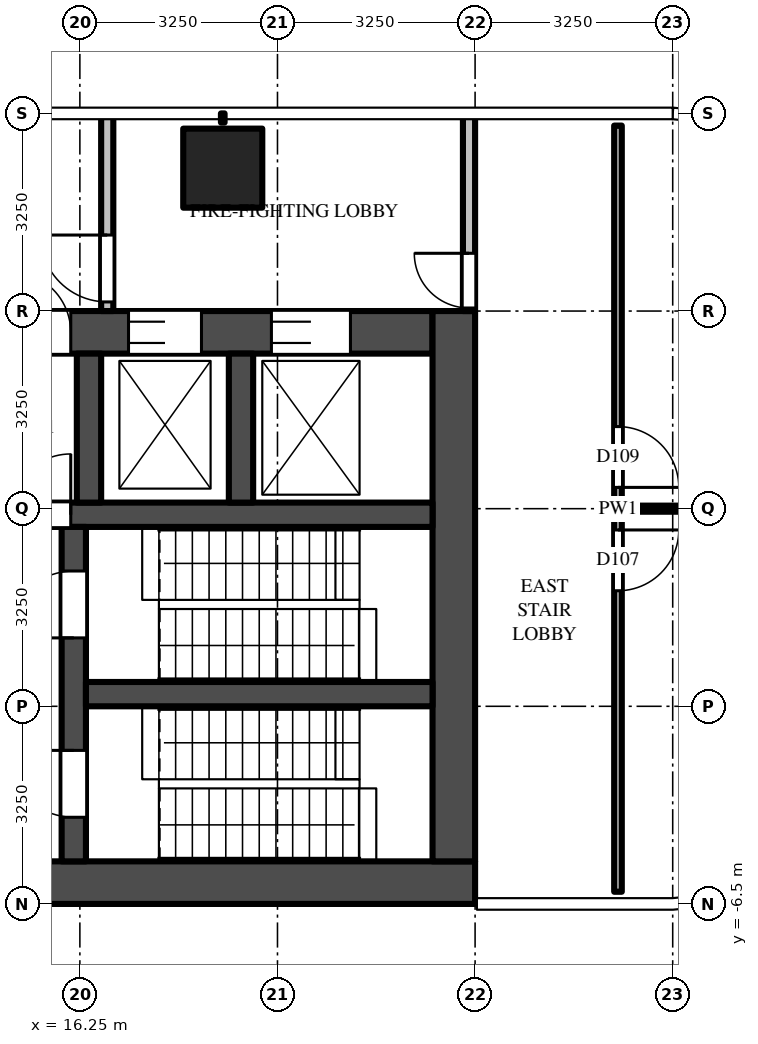
"""IFC4 building model, lengths in metres.
Left out: names, types, materials, properties, quantities, classifications, styles, units other than length and angle.
Written with IfcOpenShell. Run it as: python <this file> out.ifc"""

import sys

from ifc_helpers import new_model, si_unit, direction, frame, frame_2d, origin, origin_2d, place, context, subcontext, project, spatial, rectangle, extrude, source, transform, mapped, element, fill, save


model = new_model("IFC4")
c1 = context("Model", 3, precision=1e-05, world=origin(), true_north=direction((0.0, 1.0)))
c2 = subcontext(c1, "Body", "Model", "MODEL_VIEW")
j1 = project(units=[si_unit("LENGTHUNIT", "METRE"), si_unit("PLANEANGLEUNIT", "RADIAN")], contexts=[c1])
p1 = place(None, origin())
s1 = spatial("IfcSite", under=j1, at=p1, CompositionType="ELEMENT")
p2 = place(p1, origin())
s2 = spatial("IfcBuilding", under=s1, at=p2, CompositionType="ELEMENT")
p3 = place(p2, frame((0.0, 0.0, 138.0)))
s3 = spatial("IfcBuildingStorey", under=s2, at=p3, CompositionType="ELEMENT", Elevation=138.0)
m1 = source(origin(), c2, "Body", "SweptSolid", [
    extrude(rectangle(XDim=1.3, YDim=1.3, at=origin_2d()), origin(), (0.0, 0.0, 1.0), 4.5),
])
p4 = place(p3, frame((18.6, 5.6, 0.0), z_axis=(0.0, 0.0, 1.0), x_axis=(1.0, 0.0, 0.0)))
e1 = element("IfcColumn", 1, at=p4, inside=s3, PredefinedType="COLUMN", context=c2, shape_type="MappedRepresentation", body=[
    mapped(m1, transform((0.0, 0.0, 0.0))),
])
m2 = source(origin(), c2, "Body", "SweptSolid", [
    extrude(rectangle(XDim=16.5, YDim=0.7, at=frame_2d((8.25, 0.0))), origin(), (0.0, 0.0, 1.0), 4.25),
])
p5 = place(p3, frame((6.25, -6.15, 0.0), z_axis=(0.0, 0.0, 1.0), x_axis=(1.0, 0.0, 0.0)))
e2 = element("IfcWall", 2, at=p5, inside=s3, PredefinedType="SHEAR", context=c2, shape_type="MappedRepresentation", body=[
    mapped(m2, transform((0.0, 0.0, 0.0))),
])
m3 = source(origin(), c2, "Body", "SweptSolid", [
    extrude(rectangle(XDim=14.85, YDim=0.7, at=frame_2d((7.425, 0.0))), origin(), (0.0, 0.0, 1.0), 4.25),
])
p6 = place(p3, frame((7.2, 2.9, 0.0), z_axis=(0.0, 0.0, 1.0), x_axis=(1.0, 0.0, 0.0)))
e3 = element("IfcWall", 3, at=p6, inside=s3, PredefinedType="SHEAR", context=c2, shape_type="MappedRepresentation", body=[
    mapped(m3, transform((0.0, 0.0, 0.0))),
])
m4 = source(origin(), c2, "Body", "SweptSolid", [
    extrude(rectangle(XDim=1.3, YDim=2.1, at=frame_2d((0.65, 1.05))), frame((0.0, 0.36, 0.0), z_axis=(0.0, -1.0, 0.0), x_axis=(1.0, 0.0, 0.0)), (0.0, 0.0, 1.0), 0.72),
])
p7 = place(p6, frame((12.2, 0.0, 0.0)))
e4 = element("IfcOpeningElement", 4, at=p7, cuts=e3, PredefinedType="OPENING", context=c2, shape_type="MappedRepresentation", body=[
    mapped(m4, transform((0.0, 0.0, 0.0))),
])
m5 = source(origin(), c2, "Body", "SweptSolid", [
    extrude(rectangle(XDim=1.2, YDim=2.1, at=frame_2d((0.6, 1.05))), frame((0.0, 0.36, 0.0), z_axis=(0.0, -1.0, 0.0), x_axis=(1.0, 0.0, 0.0)), (0.0, 0.0, 1.0), 0.72),
])
p8 = place(p6, frame((9.85, 0.0, 0.0)))
e5 = element("IfcOpeningElement", 5, at=p8, cuts=e3, PredefinedType="OPENING", context=c2, shape_type="MappedRepresentation", body=[
    mapped(m5, transform((0.0, 0.0, 0.0))),
])
m6 = source(origin(), c2, "Body", "SweptSolid", [
    extrude(rectangle(XDim=1.0, YDim=2.1, at=frame_2d((0.5, 1.05))), frame((0.0, 0.36, 0.0), z_axis=(0.0, -1.0, 0.0), x_axis=(1.0, 0.0, 0.0)), (0.0, 0.0, 1.0), 0.72),
])
p9 = place(p6, frame((7.9, 0.0, 0.0)))
e6 = element("IfcOpeningElement", 6, at=p9, cuts=e3, PredefinedType="OPENING", context=c2, shape_type="MappedRepresentation", body=[
    mapped(m6, transform((0.0, 0.0, 0.0))),
])
m7 = source(origin(), c2, "Body", "SweptSolid", [
    extrude(rectangle(XDim=0.8, YDim=2.1, at=frame_2d((0.4, 1.05))), frame((0.0, 0.36, 0.0), z_axis=(0.0, -1.0, 0.0), x_axis=(1.0, 0.0, 0.0)), (0.0, 0.0, 1.0), 0.72),
])
p10 = place(p6, frame((0.113, 0.0, 0.0)))
e7 = element("IfcOpeningElement", 7, at=p10, cuts=e3, PredefinedType="OPENING", context=c2, shape_type="MappedRepresentation", body=[
    mapped(m7, transform((0.0, 0.0, 0.0))),
])
p11 = place(p6, frame((1.288, 0.0, 0.0)))
e8 = element("IfcOpeningElement", 8, at=p11, cuts=e3, PredefinedType="OPENING", context=c2, shape_type="MappedRepresentation", body=[
    mapped(m7, transform((0.0, 0.0, 0.0))),
])
p12 = place(p6, frame((2.712, 0.0, 0.0)))
e9 = element("IfcOpeningElement", 9, at=p12, cuts=e3, PredefinedType="OPENING", context=c2, shape_type="MappedRepresentation", body=[
    mapped(m7, transform((0.0, 0.0, 0.0))),
])
p13 = place(p6, frame((3.887, 0.0, 0.0)))
e10 = element("IfcOpeningElement", 10, at=p13, cuts=e3, PredefinedType="OPENING", context=c2, shape_type="MappedRepresentation", body=[
    mapped(m7, transform((0.0, 0.0, 0.0))),
])
p14 = place(p6, frame((5.312, 0.0, 0.0)))
e11 = element("IfcOpeningElement", 11, at=p14, cuts=e3, PredefinedType="OPENING", context=c2, shape_type="MappedRepresentation", body=[
    mapped(m7, transform((0.0, 0.0, 0.0))),
])
p15 = place(p6, frame((6.488, 0.0, 0.0)))
e12 = element("IfcOpeningElement", 12, at=p15, cuts=e3, PredefinedType="OPENING", context=c2, shape_type="MappedRepresentation", body=[
    mapped(m7, transform((0.0, 0.0, 0.0))),
])
m8 = source(origin(), c2, "Body", "SweptSolid", [
    extrude(rectangle(XDim=9.05, YDim=0.7, at=frame_2d((4.525, 0.0))), origin(), (0.0, 0.0, 1.0), 4.25),
])
p16 = place(p3, frame((22.4, -5.8, 0.0), z_axis=(0.0, 0.0, 1.0), x_axis=(0.0, 1.0, 0.0)))
e13 = element("IfcWall", 13, at=p16, inside=s3, PredefinedType="SHEAR", context=c2, shape_type="MappedRepresentation", body=[
    mapped(m8, transform((0.0, 0.0, 0.0))),
])
m9 = source(origin(), c2, "Body", "SweptSolid", [
    extrude(rectangle(XDim=14.85, YDim=0.4, at=frame_2d((7.425, 0.0))), origin(), (0.0, 0.0, 1.0), 4.25),
])
p17 = place(p3, frame((7.2, -0.1, 0.0), z_axis=(0.0, 0.0, 1.0), x_axis=(1.0, 0.0, 0.0)))
e14 = element("IfcWall", 14, at=p17, inside=s3, PredefinedType="SHEAR", context=c2, shape_type="MappedRepresentation", body=[
    mapped(m9, transform((0.0, 0.0, 0.0))),
])
m10 = source(origin(), c2, "Body", "SweptSolid", [
    extrude(rectangle(XDim=1.0, YDim=2.1, at=frame_2d((0.5, 1.05))), frame((0.0, 0.21, 0.0), z_axis=(0.0, -1.0, 0.0), x_axis=(1.0, 0.0, 0.0)), (0.0, 0.0, 1.0), 0.42),
])
p18 = place(p17, frame((7.9, 0.0, 0.0)))
e15 = element("IfcOpeningElement", 15, at=p18, cuts=e14, PredefinedType="OPENING", context=c2, shape_type="MappedRepresentation", body=[
    mapped(m10, transform((0.0, 0.0, 0.0))),
])
m11 = source(origin(), c2, "Body", "SweptSolid", [
    extrude(rectangle(XDim=5.5, YDim=0.4, at=frame_2d((2.75, 0.0))), origin(), (0.0, 0.0, 1.0), 4.25),
])
p19 = place(p3, frame((16.15, -5.8, 0.0), z_axis=(0.0, 0.0, 1.0), x_axis=(0.0, 1.0, 0.0)))
e16 = element("IfcWall", 16, at=p19, inside=s3, PredefinedType="SHEAR", context=c2, shape_type="MappedRepresentation", body=[
    mapped(m11, transform((0.0, 0.0, 0.0))),
])
m12 = source(origin(), c2, "Body", "SweptSolid", [
    extrude(rectangle(XDim=1.1, YDim=2.1, at=frame_2d((0.55, 1.05))), frame((0.0, 0.21, 0.0), z_axis=(0.0, -1.0, 0.0), x_axis=(1.0, 0.0, 0.0)), (0.0, 0.0, 1.0), 0.42),
])
p20 = place(p19, frame((0.725, 0.0, 0.0)))
e17 = element("IfcOpeningElement", 17, at=p20, cuts=e16, PredefinedType="OPENING", context=c2, shape_type="MappedRepresentation", body=[
    mapped(m12, transform((0.0, 0.0, 0.0))),
])
p21 = place(p19, frame((3.675, 0.0, 0.0)))
e18 = element("IfcOpeningElement", 18, at=p21, cuts=e16, PredefinedType="OPENING", context=c2, shape_type="MappedRepresentation", body=[
    mapped(m12, transform((0.0, 0.0, 0.0))),
])
m13 = source(origin(), c2, "Body", "SweptSolid", [
    extrude(rectangle(XDim=5.7, YDim=0.4, at=frame_2d((2.85, 0.0))), origin(), (0.0, 0.0, 1.0), 4.25),
])
p22 = place(p3, frame((16.35, -3.05, 0.0), z_axis=(0.0, 0.0, 1.0), x_axis=(1.0, 0.0, 0.0)))
e19 = element("IfcWall", 19, at=p22, inside=s3, PredefinedType="SHEAR", context=c2, shape_type="MappedRepresentation", body=[
    mapped(m13, transform((0.0, 0.0, 0.0))),
])
m14 = source(origin(), c2, "Body", "SweptSolid", [
    extrude(rectangle(XDim=2.45, YDim=0.4, at=frame_2d((1.225, 0.0))), origin(), (0.0, 0.0, 1.0), 4.25),
])
for number, where, z_axis, x_axis in (
    (20, (16.4, 0.1, 0.0), (0.0, 0.0, 1.0), (0.0, 1.0, 0.0)),
    (21, (18.9, 0.1, 0.0), (0.0, 0.0, 1.0), (0.0, 1.0, 0.0)),
):
    element("IfcWall", number, at=place(p3, frame(where, z_axis=z_axis, x_axis=x_axis)), inside=s3, PredefinedType="SHEAR", context=c2, shape_type="MappedRepresentation", body=[
        mapped(m14, transform((0.0, 0.0, 0.0))),
    ])
m15 = source(origin(), c2, "Body", "SweptSolid", [
    extrude(rectangle(XDim=3.25, YDim=0.2, at=frame_2d((1.625, 0.0))), origin(), (0.0, 0.0, 1.0), 4.25),
])
p23 = place(p3, frame((16.7, 3.25, 0.0), z_axis=(0.0, 0.0, 1.0), x_axis=(0.0, 1.0, 0.0)))
e22 = element("IfcWall", 22, at=p23, inside=s3, PredefinedType="PARTITIONING", context=c2, shape_type="MappedRepresentation", body=[
    mapped(m15, transform((0.0, 0.0, 0.0))),
])
m16 = source(origin(), c2, "Body", "SweptSolid", [
    extrude(rectangle(XDim=1.1, YDim=2.1, at=frame_2d((0.55, 1.05))), frame((0.0, 0.11, 0.0), z_axis=(0.0, -1.0, 0.0), x_axis=(1.0, 0.0, 0.0)), (0.0, 0.0, 1.0), 0.22),
])
p24 = place(p23, frame((0.15, 0.0, 0.0)))
e23 = element("IfcOpeningElement", 23, at=p24, cuts=e22, PredefinedType="OPENING", context=c2, shape_type="MappedRepresentation", body=[
    mapped(m16, transform((0.0, 0.0, 0.0))),
])
p25 = place(p3, frame((22.65, 3.25, 0.0), z_axis=(0.0, 0.0, 1.0), x_axis=(0.0, 1.0, 0.0)))
e24 = element("IfcWall", 24, at=p25, inside=s3, PredefinedType="PARTITIONING", context=c2, shape_type="MappedRepresentation", body=[
    mapped(m15, transform((0.0, 0.0, 0.0))),
])
m17 = source(origin(), c2, "Body", "SweptSolid", [
    extrude(rectangle(XDim=0.9, YDim=2.1, at=frame_2d((0.45, 1.05))), frame((0.0, 0.11, 0.0), z_axis=(0.0, -1.0, 0.0), x_axis=(1.0, 0.0, 0.0)), (0.0, 0.0, 1.0), 0.22),
])
p26 = place(p25, frame((0.05, 0.0, 0.0)))
e25 = element("IfcOpeningElement", 25, at=p26, cuts=e24, PredefinedType="OPENING", context=c2, shape_type="MappedRepresentation", body=[
    mapped(m17, transform((0.0, 0.0, 0.0))),
])
m18 = source(origin(), c2, "Body", "SweptSolid", [
    extrude(rectangle(XDim=12.6, YDim=0.125, at=frame_2d((6.3, 0.0))), origin(), (0.0, 0.0, 1.0), 3.33),
])
p27 = place(p3, frame((25.1, 6.3, 0.0), z_axis=(0.0, 0.0, 1.0), x_axis=(0.0, -1.0, 0.0)))
e26 = element("IfcWall", 26, at=p27, inside=s3, PredefinedType="PARTITIONING", context=c2, shape_type="MappedRepresentation", body=[
    mapped(m18, transform((0.0, 0.0, 0.0))),
])
m19 = source(origin(), c2, "Body", "SweptSolid", [
    extrude(rectangle(XDim=1.0, YDim=2.1, at=frame_2d((0.5, 1.05))), frame((0.0, 0.073, 0.0), z_axis=(0.0, -1.0, 0.0), x_axis=(1.0, 0.0, 0.0)), (0.0, 0.0, 1.0), 0.145),
])
p28 = place(p27, frame((6.65, 0.0, 0.0)))
e27 = element("IfcOpeningElement", 27, at=p28, cuts=e26, PredefinedType="OPENING", context=c2, shape_type="MappedRepresentation", body=[
    mapped(m19, transform((0.0, 0.0, 0.0))),
])
p29 = place(p27, frame((4.95, 0.0, 0.0)))
e28 = element("IfcOpeningElement", 28, at=p29, cuts=e26, PredefinedType="OPENING", context=c2, shape_type="MappedRepresentation", body=[
    mapped(m19, transform((0.0, 0.0, 0.0))),
])
m20 = source(origin(), c2, "Body", "SweptSolid", [
    extrude(rectangle(XDim=3.887, YDim=0.1, at=frame_2d((1.944, 0.0))), origin(), (0.0, 0.0, 1.0), 3.33),
])
p30 = place(p3, frame((25.163, 0.0, 0.0), z_axis=(0.0, 0.0, 1.0), x_axis=(1.0, 0.0, 0.0)))
e29 = element("IfcWall", 29, at=p30, inside=s3, PredefinedType="PARTITIONING", context=c2, shape_type="MappedRepresentation", body=[
    mapped(m20, transform((0.0, 0.0, 0.0))),
])
m21 = source(origin(), c2, "Body", "SweptSolid", [
    extrude(rectangle(XDim=1.3, YDim=2.1, at=frame_2d((0.65, 1.05))), frame((0.0, -0.275, 0.0), z_axis=(0.0, -1.0, 0.0), x_axis=(1.0, 0.0, 0.0)), (0.0, 0.0, 1.0), 0.05),
])
p31 = place(p7, origin())
e30 = element("IfcDoor", 30, at=p31, inside=s3, OperationType="DOUBLE_DOOR_SLIDING", PredefinedType="DOOR", context=c2, shape_type="MappedRepresentation", body=[
    mapped(m21, transform((0.0, 0.0, 0.0))),
])
fill(e4, e30)
m22 = source(origin(), c2, "Body", "SweptSolid", [
    extrude(rectangle(XDim=1.2, YDim=2.1, at=frame_2d((0.6, 1.05))), frame((0.0, -0.275, 0.0), z_axis=(0.0, -1.0, 0.0), x_axis=(1.0, 0.0, 0.0)), (0.0, 0.0, 1.0), 0.05),
])
p32 = place(p8, origin())
e31 = element("IfcDoor", 31, at=p32, inside=s3, OperationType="DOUBLE_DOOR_SLIDING", PredefinedType="DOOR", context=c2, shape_type="MappedRepresentation", body=[
    mapped(m22, transform((0.0, 0.0, 0.0))),
])
fill(e5, e31)
m23 = source(origin(), c2, "Body", "SweptSolid", [
    extrude(rectangle(XDim=1.1, YDim=2.1, at=frame_2d((0.55, 1.05))), frame((0.0, 0.025, 0.0), z_axis=(0.0, -1.0, 0.0), x_axis=(1.0, 0.0, 0.0)), (0.0, 0.0, 1.0), 0.05),
])
p33 = place(p20, origin())
e32 = element("IfcDoor", 32, at=p33, inside=s3, OperationType="SINGLE_SWING_RIGHT", PredefinedType="DOOR", context=c2, shape_type="MappedRepresentation", body=[
    mapped(m23, transform((0.0, 0.0, 0.0))),
])
fill(e17, e32)
p34 = place(p21, origin())
e33 = element("IfcDoor", 33, at=p34, inside=s3, OperationType="SINGLE_SWING_LEFT", PredefinedType="DOOR", context=c2, shape_type="MappedRepresentation", body=[
    mapped(m23, transform((0.0, 0.0, 0.0))),
])
fill(e18, e33)
m24 = source(origin(), c2, "Body", "SweptSolid", [
    extrude(rectangle(XDim=1.0, YDim=2.1, at=frame_2d((0.5, 1.05))), frame((0.0, 0.025, 0.0), z_axis=(0.0, -1.0, 0.0), x_axis=(1.0, 0.0, 0.0)), (0.0, 0.0, 1.0), 0.05),
])
p35 = place(p18, origin())
e34 = element("IfcDoor", 34, at=p35, inside=s3, OperationType="SINGLE_SWING_RIGHT", PredefinedType="DOOR", context=c2, shape_type="MappedRepresentation", body=[
    mapped(m24, transform((0.0, 0.0, 0.0))),
])
fill(e15, e34)
m25 = source(origin(), c2, "Body", "SweptSolid", [
    extrude(rectangle(XDim=1.0, YDim=2.1, at=frame_2d((0.5, 1.05))), frame((0.0, -0.275, 0.0), z_axis=(0.0, -1.0, 0.0), x_axis=(1.0, 0.0, 0.0)), (0.0, 0.0, 1.0), 0.05),
])
p36 = place(p9, origin())
e35 = element("IfcDoor", 35, at=p36, inside=s3, OperationType="SINGLE_SWING_LEFT", PredefinedType="DOOR", context=c2, shape_type="MappedRepresentation", body=[
    mapped(m25, transform((0.0, 0.0, 0.0))),
])
fill(e6, e35)
p37 = place(p24, origin())
e36 = element("IfcDoor", 36, at=p37, inside=s3, OperationType="SINGLE_SWING_RIGHT", PredefinedType="DOOR", context=c2, shape_type="MappedRepresentation", body=[
    mapped(m23, transform((0.0, 0.0, 0.0))),
])
fill(e23, e36)
m26 = source(origin(), c2, "Body", "SweptSolid", [
    extrude(rectangle(XDim=0.9, YDim=2.1, at=frame_2d((0.45, 1.05))), frame((0.0, 0.025, 0.0), z_axis=(0.0, -1.0, 0.0), x_axis=(1.0, 0.0, 0.0)), (0.0, 0.0, 1.0), 0.05),
])
p38 = place(p26, origin())
e37 = element("IfcDoor", 37, at=p38, inside=s3, OperationType="SINGLE_SWING_RIGHT", PredefinedType="DOOR", context=c2, shape_type="MappedRepresentation", body=[
    mapped(m26, transform((0.0, 0.0, 0.0))),
])
fill(e25, e37)
p39 = place(p28, origin())
e38 = element("IfcDoor", 38, at=p39, inside=s3, OperationType="SINGLE_SWING_LEFT", PredefinedType="DOOR", context=c2, shape_type="MappedRepresentation", body=[
    mapped(m24, transform((0.0, 0.0, 0.0))),
])
fill(e27, e38)
p40 = place(p29, origin())
e39 = element("IfcDoor", 39, at=p40, inside=s3, OperationType="SINGLE_SWING_RIGHT", PredefinedType="DOOR", context=c2, shape_type="MappedRepresentation", body=[
    mapped(m24, transform((0.0, 0.0, 0.0))),
])
fill(e28, e39)
save(model, sys.argv[1])
